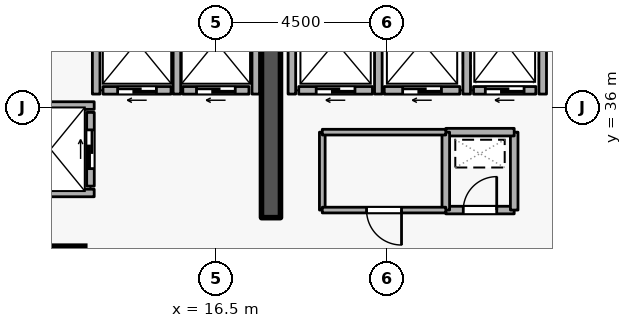
"""IFC4 building model, lengths in metres.
Left out: names, types, materials, properties, quantities, classifications, styles, units other than length and angle.
Written with IfcOpenShell. Run it as: python <this file> out.ifc"""

import sys

from ifc_helpers import new_model, si_unit, direction, frame, frame_2d, origin, origin_2d, place, context, subcontext, project, spatial, rectangle, extrude, element, fill, save


model = new_model("IFC4")
c1 = context("Model", 3, precision=1e-05, world=origin(), true_north=direction((0.0, 1.0)))
c2 = subcontext(c1, "Body", "Model", "MODEL_VIEW")
j1 = project(units=[si_unit("LENGTHUNIT", "METRE"), si_unit("PLANEANGLEUNIT", "RADIAN")], contexts=[c1])
p1 = place(None, origin())
s1 = spatial("IfcSite", under=j1, at=p1, CompositionType="ELEMENT")
p2 = place(p1, origin())
s2 = spatial("IfcBuilding", under=s1, at=p2, CompositionType="ELEMENT")
p3 = place(p2, frame((0.0, 0.0, 196.5)))
s3 = spatial("IfcBuildingStorey", under=s2, at=p3, CompositionType="ELEMENT", Elevation=196.5)
p4 = place(p3, frame((17.95, 33.1, 0.0), z_axis=(0.0, 0.0, 1.0), x_axis=(0.0, 1.0, 0.0)))
e1 = element("IfcWall", 1, at=p4, inside=s3, PredefinedType="SHEAR", context=c2, shape_type="SweptSolid", body=[
    extrude(rectangle(XDim=5.8, YDim=0.5, at=frame_2d((2.9, 0.0))), origin(), (0.0, 0.0, 1.0), 3.6),
])
p5 = place(p3, frame((12.5, 31.8, 0.0), z_axis=(0.0, 0.0, 1.0), x_axis=(1.0, 0.0, 0.0)))
e2 = element("IfcColumn", 2, at=p5, inside=s3, PredefinedType="COLUMN", context=c2, shape_type="SweptSolid", body=[
    extrude(rectangle(XDim=1.1, YDim=1.1, at=origin_2d()), origin(), (0.0, 0.0, 1.0), 3.6),
])
p6 = place(p3, frame((24.92, 36.45, 0.0), z_axis=(0.0, 0.0, 1.0), x_axis=(-1.0, 0.0, 0.0)))
e3 = element("IfcWall", 3, at=p6, inside=s3, PredefinedType="STANDARD", context=c2, shape_type="SweptSolid", body=[
    extrude(rectangle(XDim=1.64, YDim=0.2, at=frame_2d((0.82, 0.0))), origin(), (0.0, 0.0, 1.0), 3.32),
])
p7 = place(p6, frame((0.31, 0.0, 0.0)))
e4 = element("IfcOpeningElement", 4, at=p7, cuts=e3, PredefinedType="OPENING", context=c2, shape_type="SweptSolid", body=[
    extrude(rectangle(XDim=1.02, YDim=2.06, at=frame_2d((0.51, 1.03))), frame((0.0, 0.11, 0.0), z_axis=(0.0, -1.0, 0.0), x_axis=(1.0, 0.0, 0.0)), (0.0, 0.0, 1.0), 0.22),
])
p8 = place(p3, frame((22.92, 36.45, 0.0), z_axis=(0.0, 0.0, 1.0), x_axis=(-1.0, 0.0, 0.0)))
e5 = element("IfcWall", 5, at=p8, inside=s3, PredefinedType="STANDARD", context=c2, shape_type="SweptSolid", body=[
    extrude(rectangle(XDim=1.99, YDim=0.2, at=frame_2d((0.995, 0.0))), origin(), (0.0, 0.0, 1.0), 3.32),
])
p9 = place(p8, frame((0.485, 0.0, 0.0)))
e6 = element("IfcOpeningElement", 6, at=p9, cuts=e5, PredefinedType="OPENING", context=c2, shape_type="SweptSolid", body=[
    extrude(rectangle(XDim=1.02, YDim=2.06, at=frame_2d((0.51, 1.03))), frame((0.0, 0.11, 0.0), z_axis=(0.0, -1.0, 0.0), x_axis=(1.0, 0.0, 0.0)), (0.0, 0.0, 1.0), 0.22),
])
p10 = place(p3, frame((20.62, 36.45, 0.0), z_axis=(0.0, 0.0, 1.0), x_axis=(-1.0, 0.0, 0.0)))
e7 = element("IfcWall", 7, at=p10, inside=s3, PredefinedType="STANDARD", context=c2, shape_type="SweptSolid", body=[
    extrude(rectangle(XDim=1.94, YDim=0.2, at=frame_2d((0.97, 0.0))), origin(), (0.0, 0.0, 1.0), 3.32),
])
p11 = place(p10, frame((0.46, 0.0, 0.0)))
e8 = element("IfcOpeningElement", 8, at=p11, cuts=e7, PredefinedType="OPENING", context=c2, shape_type="SweptSolid", body=[
    extrude(rectangle(XDim=1.02, YDim=2.06, at=frame_2d((0.51, 1.03))), frame((0.0, 0.11, 0.0), z_axis=(0.0, -1.0, 0.0), x_axis=(1.0, 0.0, 0.0)), (0.0, 0.0, 1.0), 0.22),
])
p12 = place(p3, frame((17.37, 36.45, 0.0), z_axis=(0.0, 0.0, 1.0), x_axis=(-1.0, 0.0, 0.0)))
e9 = element("IfcWall", 9, at=p12, inside=s3, PredefinedType="STANDARD", context=c2, shape_type="SweptSolid", body=[
    extrude(rectangle(XDim=1.74, YDim=0.2, at=frame_2d((0.87, 0.0))), origin(), (0.0, 0.0, 1.0), 3.32),
])
p13 = place(p12, frame((0.36, 0.0, 0.0)))
e10 = element("IfcOpeningElement", 10, at=p13, cuts=e9, PredefinedType="OPENING", context=c2, shape_type="SweptSolid", body=[
    extrude(rectangle(XDim=1.02, YDim=2.06, at=frame_2d((0.51, 1.03))), frame((0.0, 0.11, 0.0), z_axis=(0.0, -1.0, 0.0), x_axis=(1.0, 0.0, 0.0)), (0.0, 0.0, 1.0), 0.22),
])
p14 = place(p3, frame((15.32, 36.45, 0.0), z_axis=(0.0, 0.0, 1.0), x_axis=(-1.0, 0.0, 0.0)))
e11 = element("IfcWall", 11, at=p14, inside=s3, PredefinedType="STANDARD", context=c2, shape_type="SweptSolid", body=[
    extrude(rectangle(XDim=1.79, YDim=0.2, at=frame_2d((0.895, 0.0))), origin(), (0.0, 0.0, 1.0), 3.32),
])
p15 = place(p14, frame((0.385, 0.0, 0.0)))
e12 = element("IfcOpeningElement", 12, at=p15, cuts=e11, PredefinedType="OPENING", context=c2, shape_type="SweptSolid", body=[
    extrude(rectangle(XDim=1.02, YDim=2.06, at=frame_2d((0.51, 1.03))), frame((0.0, 0.11, 0.0), z_axis=(0.0, -1.0, 0.0), x_axis=(1.0, 0.0, 0.0)), (0.0, 0.0, 1.0), 0.22),
])
p16 = place(p3, frame((13.2, 33.93, 0.0), z_axis=(0.0, 0.0, 1.0), x_axis=(0.0, 1.0, 0.0)))
e13 = element("IfcWall", 13, at=p16, inside=s3, PredefinedType="STANDARD", context=c2, shape_type="SweptSolid", body=[
    extrude(rectangle(XDim=1.94, YDim=0.2, at=frame_2d((0.97, 0.0))), origin(), (0.0, 0.0, 1.0), 3.32),
])
p17 = place(p16, frame((0.46, 0.0, 0.0)))
e14 = element("IfcOpeningElement", 14, at=p17, cuts=e13, PredefinedType="OPENING", context=c2, shape_type="SweptSolid", body=[
    extrude(rectangle(XDim=1.02, YDim=2.06, at=frame_2d((0.51, 1.03))), frame((0.0, 0.11, 0.0), z_axis=(0.0, -1.0, 0.0), x_axis=(1.0, 0.0, 0.0)), (0.0, 0.0, 1.0), 0.22),
])
p18 = place(p3, frame((25.1, 36.352, 0.0), z_axis=(0.0, 0.0, 1.0), x_axis=(0.0, 1.0, 0.0)))
e15 = element("IfcWall", 15, at=p18, inside=s3, PredefinedType="STANDARD", context=c2, shape_type="SweptSolid", body=[
    extrude(rectangle(XDim=2.536, YDim=0.2, at=frame_2d((1.268, 0.0))), origin(), (0.0, 0.0, 1.0), 1.785),
])
for number, where, z_axis, x_axis in (
    (16, (23.1, 36.352, 0.0), (0.0, 0.0, 1.0), (0.0, 1.0, 0.0)),
    (17, (20.775, 36.352, 0.0), (0.0, 0.0, 1.0), (0.0, 1.0, 0.0)),
    (18, (18.5, 36.352, 0.0), (0.0, 0.0, 1.0), (0.0, 1.0, 0.0)),
):
    element("IfcWall", number, at=place(p3, frame(where, z_axis=z_axis, x_axis=x_axis)), inside=s3, PredefinedType="STANDARD", context=c2, shape_type="SweptSolid", body=[
        extrude(rectangle(XDim=2.536, YDim=0.2, at=frame_2d((1.268, 0.0))), origin(), (0.0, 0.0, 1.0), 3.32),
    ])
p19 = place(p3, frame((17.55, 36.352, 0.0), z_axis=(0.0, 0.0, 1.0), x_axis=(0.0, 1.0, 0.0)))
e19 = element("IfcWall", 19, at=p19, inside=s3, PredefinedType="STANDARD", context=c2, shape_type="SweptSolid", body=[
    extrude(rectangle(XDim=2.636, YDim=0.2, at=frame_2d((1.318, 0.0))), origin(), (0.0, 0.0, 1.0), 2.525),
])
for number, where, z_axis, x_axis in (
    (20, (15.475, 36.352, 0.0), (0.0, 0.0, 1.0), (0.0, 1.0, 0.0)),
    (21, (13.35, 36.352, 0.0), (0.0, 0.0, 1.0), (0.0, 1.0, 0.0)),
):
    element("IfcWall", number, at=place(p3, frame(where, z_axis=z_axis, x_axis=x_axis)), inside=s3, PredefinedType="STANDARD", context=c2, shape_type="SweptSolid", body=[
        extrude(rectangle(XDim=2.636, YDim=0.2, at=frame_2d((1.318, 0.0))), origin(), (0.0, 0.0, 1.0), 3.32),
    ])
for number, where, z_axis, x_axis in (
    (22, (11.002, 36.05, 0.0), (0.0, 0.0, 1.0), (1.0, 0.0, 0.0)),
    (23, (11.002, 33.75, 0.0), (0.0, 0.0, 1.0), (1.0, 0.0, 0.0)),
):
    element("IfcWall", number, at=place(p3, frame(where, z_axis=z_axis, x_axis=x_axis)), inside=s3, PredefinedType="STANDARD", context=c2, shape_type="SweptSolid", body=[
        extrude(rectangle(XDim=2.296, YDim=0.2, at=frame_2d((1.148, 0.0))), origin(), (0.0, 0.0, 1.0), 3.32),
    ])
p20 = place(p3, frame((22.55, 33.3, 0.0), z_axis=(0.0, 0.0, 1.0), x_axis=(1.0, 0.0, 0.0)))
e24 = element("IfcWall", 24, at=p20, inside=s3, PredefinedType="STANDARD", context=c2, shape_type="SweptSolid", body=[
    extrude(rectangle(XDim=1.8, YDim=0.2, at=frame_2d((0.9, 0.0))), origin(), (0.0, 0.0, 1.0), 3.32),
])
p21 = place(p20, frame((0.46, 0.0, 0.0)))
e25 = element("IfcOpeningElement", 25, at=p21, cuts=e24, PredefinedType="OPENING", context=c2, shape_type="SweptSolid", body=[
    extrude(rectangle(XDim=0.88, YDim=2.04, at=frame_2d((0.44, 1.02))), frame((0.0, 0.11, 0.0), z_axis=(0.0, -1.0, 0.0), x_axis=(1.0, 0.0, 0.0)), (0.0, 0.0, 1.0), 0.22),
])
p22 = place(p3, frame((24.35, 33.3, 0.0), z_axis=(0.0, 0.0, 1.0), x_axis=(0.0, 1.0, 0.0)))
e26 = element("IfcWall", 26, at=p22, inside=s3, PredefinedType="STANDARD", context=c2, shape_type="SweptSolid", body=[
    extrude(rectangle(XDim=2.05, YDim=0.2, at=frame_2d((1.025, 0.0))), origin(), (0.0, 0.0, 1.0), 3.32),
])
p23 = place(p3, frame((24.35, 35.35, 0.0), z_axis=(0.0, 0.0, 1.0), x_axis=(-1.0, 0.0, 0.0)))
e27 = element("IfcWall", 27, at=p23, inside=s3, PredefinedType="STANDARD", context=c2, shape_type="SweptSolid", body=[
    extrude(rectangle(XDim=1.8, YDim=0.2, at=frame_2d((0.9, 0.0))), origin(), (0.0, 0.0, 1.0), 3.32),
])
p24 = place(p3, frame((22.55, 35.35, 0.0), z_axis=(0.0, 0.0, 1.0), x_axis=(0.0, -1.0, 0.0)))
e28 = element("IfcWall", 28, at=p24, inside=s3, PredefinedType="STANDARD", context=c2, shape_type="SweptSolid", body=[
    extrude(rectangle(XDim=2.05, YDim=0.2, at=frame_2d((1.025, 0.0))), origin(), (0.0, 0.0, 1.0), 3.32),
])
p25 = place(p3, frame((19.3, 33.3, 0.0), z_axis=(0.0, 0.0, 1.0), x_axis=(0.0, 1.0, 0.0)))
e29 = element("IfcWall", 29, at=p25, inside=s3, PredefinedType="PARTITIONING", context=c2, shape_type="SweptSolid", body=[
    extrude(rectangle(XDim=2.05, YDim=0.15, at=frame_2d((1.025, 0.0))), origin(), (0.0, 0.0, 1.0), 3.32),
])
p26 = place(p3, frame((19.3, 35.35, 0.0), z_axis=(0.0, 0.0, 1.0), x_axis=(1.0, 0.0, 0.0)))
e30 = element("IfcWall", 30, at=p26, inside=s3, PredefinedType="PARTITIONING", context=c2, shape_type="SweptSolid", body=[
    extrude(rectangle(XDim=3.25, YDim=0.15, at=frame_2d((1.625, 0.0))), origin(), (0.0, 0.0, 1.0), 3.32),
])
p27 = place(p3, frame((22.55, 33.3, 0.0), z_axis=(0.0, 0.0, 1.0), x_axis=(-1.0, 0.0, 0.0)))
e31 = element("IfcWall", 31, at=p27, inside=s3, PredefinedType="PARTITIONING", context=c2, shape_type="SweptSolid", body=[
    extrude(rectangle(XDim=3.25, YDim=0.15, at=frame_2d((1.625, 0.0))), origin(), (0.0, 0.0, 1.0), 3.32),
])
p28 = place(p27, frame((1.165, 0.0, 0.0)))
e32 = element("IfcOpeningElement", 32, at=p28, cuts=e31, PredefinedType="OPENING", context=c2, shape_type="SweptSolid", body=[
    extrude(rectangle(XDim=0.92, YDim=2.08, at=frame_2d((0.46, 1.04))), frame((0.0, 0.085, 0.0), z_axis=(0.0, -1.0, 0.0), x_axis=(1.0, 0.0, 0.0)), (0.0, 0.0, 1.0), 0.17),
])
p29 = place(p7, origin())
e33 = element("IfcDoor", 33, at=p29, inside=s3, OperationType="SLIDING_TO_LEFT", PredefinedType="DOOR", context=c2, shape_type="SweptSolid", body=[
    extrude(rectangle(XDim=1.02, YDim=2.06, at=frame_2d((0.51, 1.03))), frame((0.0, 0.025, 0.0), z_axis=(0.0, -1.0, 0.0), x_axis=(1.0, 0.0, 0.0)), (0.0, 0.0, 1.0), 0.05),
])
fill(e4, e33)
p30 = place(p9, origin())
e34 = element("IfcDoor", 34, at=p30, inside=s3, OperationType="SLIDING_TO_LEFT", PredefinedType="DOOR", context=c2, shape_type="SweptSolid", body=[
    extrude(rectangle(XDim=1.02, YDim=2.06, at=frame_2d((0.51, 1.03))), frame((0.0, 0.025, 0.0), z_axis=(0.0, -1.0, 0.0), x_axis=(1.0, 0.0, 0.0)), (0.0, 0.0, 1.0), 0.05),
])
fill(e6, e34)
p31 = place(p11, origin())
e35 = element("IfcDoor", 35, at=p31, inside=s3, OperationType="SLIDING_TO_LEFT", PredefinedType="DOOR", context=c2, shape_type="SweptSolid", body=[
    extrude(rectangle(XDim=1.02, YDim=2.06, at=frame_2d((0.51, 1.03))), frame((0.0, 0.025, 0.0), z_axis=(0.0, -1.0, 0.0), x_axis=(1.0, 0.0, 0.0)), (0.0, 0.0, 1.0), 0.05),
])
fill(e8, e35)
p32 = place(p13, origin())
e36 = element("IfcDoor", 36, at=p32, inside=s3, OperationType="SLIDING_TO_LEFT", PredefinedType="DOOR", context=c2, shape_type="SweptSolid", body=[
    extrude(rectangle(XDim=1.02, YDim=2.06, at=frame_2d((0.51, 1.03))), frame((0.0, 0.025, 0.0), z_axis=(0.0, -1.0, 0.0), x_axis=(1.0, 0.0, 0.0)), (0.0, 0.0, 1.0), 0.05),
])
fill(e10, e36)
p33 = place(p15, origin())
e37 = element("IfcDoor", 37, at=p33, inside=s3, OperationType="SLIDING_TO_LEFT", PredefinedType="DOOR", context=c2, shape_type="SweptSolid", body=[
    extrude(rectangle(XDim=1.02, YDim=2.06, at=frame_2d((0.51, 1.03))), frame((0.0, 0.025, 0.0), z_axis=(0.0, -1.0, 0.0), x_axis=(1.0, 0.0, 0.0)), (0.0, 0.0, 1.0), 0.05),
])
fill(e12, e37)
p34 = place(p17, origin())
e38 = element("IfcDoor", 38, at=p34, inside=s3, OperationType="SLIDING_TO_LEFT", PredefinedType="DOOR", context=c2, shape_type="SweptSolid", body=[
    extrude(rectangle(XDim=1.02, YDim=2.06, at=frame_2d((0.51, 1.03))), frame((0.0, 0.025, 0.0), z_axis=(0.0, -1.0, 0.0), x_axis=(1.0, 0.0, 0.0)), (0.0, 0.0, 1.0), 0.05),
])
fill(e14, e38)
p35 = place(p21, origin())
e39 = element("IfcDoor", 39, at=p35, inside=s3, OperationType="SINGLE_SWING_RIGHT", PredefinedType="DOOR", context=c2, shape_type="SweptSolid", body=[
    extrude(rectangle(XDim=0.88, YDim=2.04, at=frame_2d((0.44, 1.02))), frame((0.0, 0.025, 0.0), z_axis=(0.0, -1.0, 0.0), x_axis=(1.0, 0.0, 0.0)), (0.0, 0.0, 1.0), 0.05),
])
fill(e25, e39)
p36 = place(p28, origin())
e40 = element("IfcDoor", 40, at=p36, inside=s3, OperationType="SINGLE_SWING_LEFT", PredefinedType="DOOR", context=c2, shape_type="SweptSolid", body=[
    extrude(rectangle(XDim=0.92, YDim=2.08, at=frame_2d((0.46, 1.04))), frame((0.0, 0.025, 0.0), z_axis=(0.0, -1.0, 0.0), x_axis=(1.0, 0.0, 0.0)), (0.0, 0.0, 1.0), 0.05),
])
fill(e32, e40)
save(model, sys.argv[1])
